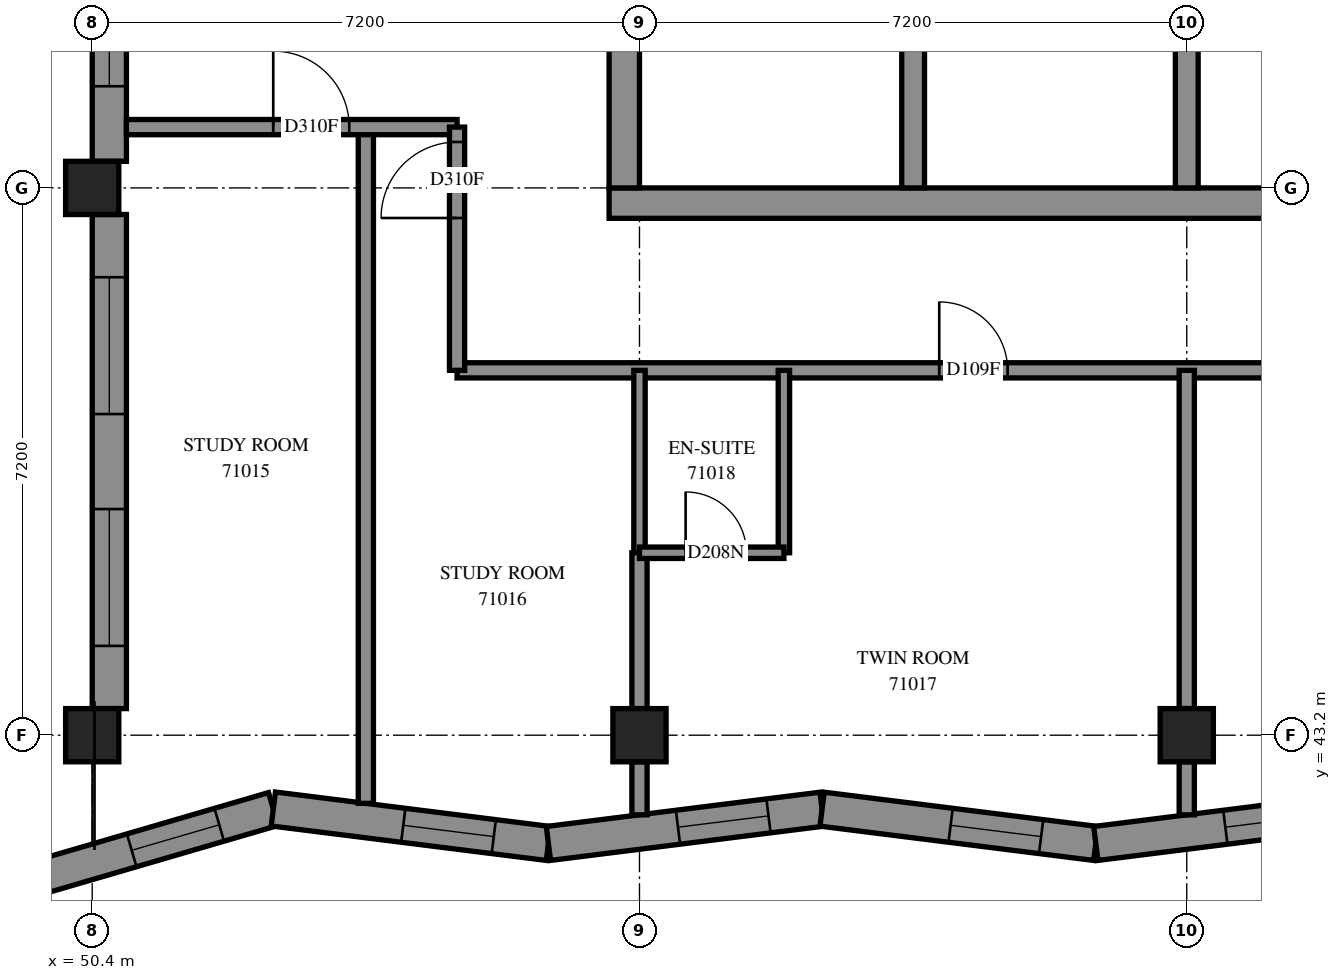
"""IFC4 building model, lengths in metres.
Left out: names, types, materials, properties, quantities, classifications, styles, units other than length and angle.
Written with IfcOpenShell. Run it as: python <this file> out.ifc"""

import sys

from ifc_helpers import new_model, si_unit, direction, frame, frame_2d, origin, origin_2d, place, context, subcontext, project, spatial, polyline, rectangle, outline, extrude, element, fill, save


model = new_model("IFC4")
c1 = context("Model", 3, precision=1e-05, world=origin(), true_north=direction((0.0, 1.0)))
c2 = subcontext(c1, "Body", "Model", "MODEL_VIEW")
j1 = project(units=[si_unit("LENGTHUNIT", "METRE"), si_unit("PLANEANGLEUNIT", "RADIAN")], contexts=[c1])
p1 = place(None, origin())
s1 = spatial("IfcSite", under=j1, at=p1, CompositionType="ELEMENT")
p2 = place(p1, origin())
s2 = spatial("IfcBuilding", under=s1, at=p2, CompositionType="ELEMENT")
p3 = place(p2, frame((0.0, 0.0, 260.8)))
s3 = spatial("IfcBuildingStorey", under=s2, at=p3, CompositionType="ELEMENT", Elevation=260.8)
for number, where, z_axis, x_axis in (
    (1, (50.4, 43.2, 0.0), (0.0, 0.0, 1.0), (1.0, 0.0, 0.0)),
    (2, (50.4, 50.4, 0.0), (0.0, 0.0, 1.0), (1.0, 0.0, 0.0)),
    (3, (57.6, 43.2, 0.0), (0.0, 0.0, 1.0), (1.0, 0.0, 0.0)),
    (4, (64.8, 43.2, 0.0), (0.0, 0.0, 1.0), (1.0, 0.0, 0.0)),
):
    element("IfcColumn", number, at=place(p3, frame(where, z_axis=z_axis, x_axis=x_axis)), inside=s3, PredefinedType="COLUMN", context=c2, shape_type="SweptSolid", body=[
        extrude(rectangle(XDim=0.7, YDim=0.7, at=origin_2d()), origin(), (0.0, 0.0, 1.0), 3.1),
    ])
p4 = place(p3, frame((57.2, 50.2, -0.3), z_axis=(0.0, 0.0, 1.0), x_axis=(1.0, 0.0, 0.0)))
e5 = element("IfcWall", 5, at=p4, inside=s3, PredefinedType="SHEAR", context=c2, shape_type="SweptSolid", body=[
    extrude(rectangle(XDim=15.2, YDim=0.4, at=frame_2d((7.6, 0.0))), origin(), (0.0, 0.0, 1.0), 2.7),
])
p5 = place(p3, frame((57.4, 50.4, -0.3), z_axis=(0.0, 0.0, 1.0), x_axis=(0.0, 1.0, 0.0)))
e6 = element("IfcWall", 6, at=p5, inside=s3, PredefinedType="SHEAR", context=c2, shape_type="SweptSolid", body=[
    extrude(rectangle(XDim=14.4, YDim=0.4, at=frame_2d((7.2, 0.0))), origin(), (0.0, 0.0, 1.0), 2.7),
])
p6 = place(p5, frame((4.55, 0.0, 0.3)))
e7 = element("IfcOpeningElement", 7, at=p6, cuts=e6, PredefinedType="OPENING", context=c2, shape_type="SweptSolid", body=[
    extrude(rectangle(XDim=1.1, YDim=2.1, at=frame_2d((0.55, 1.05))), frame((0.0, 0.21, 0.0), z_axis=(0.0, -1.0, 0.0), x_axis=(1.0, 0.0, 0.0)), (0.0, 0.0, 1.0), 0.42),
])
p7 = place(p5, frame((11.35, 0.0, 0.3)))
e8 = element("IfcOpeningElement", 8, at=p7, cuts=e6, PredefinedType="OPENING", context=c2, shape_type="SweptSolid", body=[
    extrude(rectangle(XDim=1.1, YDim=2.1, at=frame_2d((0.55, 1.05))), frame((0.0, 0.21, 0.0), z_axis=(0.0, -1.0, 0.0), x_axis=(1.0, 0.0, 0.0)), (0.0, 0.0, 1.0), 0.42),
])
for number, where, z_axis, x_axis in (
    (9, (61.2, 50.4, 0.0), (0.0, 0.0, 1.0), (0.0, 1.0, 0.0)),
    (10, (64.8, 50.4, 0.0), (0.0, 0.0, 1.0), (0.0, 1.0, 0.0)),
):
    element("IfcWall", number, at=place(p3, frame(where, z_axis=z_axis, x_axis=x_axis)), inside=s3, PredefinedType="SOLIDWALL", context=c2, shape_type="SweptSolid", body=[
        extrude(rectangle(XDim=3.3, YDim=0.3, at=frame_2d((1.65, 0.0))), origin(), (0.0, 0.0, 1.0), 3.1),
    ])
p8 = place(p3, frame((49.425, 41.249, 0.0), z_axis=(0.0, 0.0, 1.0), x_axis=(0.9599538763, 0.2801580901, 0.0)))
e11 = element("IfcWall", 11, at=p8, inside=s3, PredefinedType="SOLIDWALL", context=c2, shape_type="SweptSolid", body=[
    extrude(outline(polyline([(-0.3, -0.225), (3.451, -0.225), (3.544, 0.225), (0.3, 0.225), (-0.3, -0.225)])), origin(), (0.0, 0.0, 1.0), 3.1),
])
p9 = place(p8, frame((1.557, 0.0, 0.45)))
e12 = element("IfcOpeningElement", 12, at=p9, cuts=e11, PredefinedType="OPENING", context=c2, shape_type="SweptSolid", body=[
    extrude(rectangle(XDim=1.2, YDim=2.55, at=frame_2d((0.6, 1.275))), frame((0.0, 0.235, 0.0), z_axis=(0.0, -1.0, 0.0), x_axis=(1.0, 0.0, 0.0)), (0.0, 0.0, 1.0), 0.47),
])
p10 = place(p3, frame((52.783, 42.229, 0.0), z_axis=(0.0, 0.0, 1.0), x_axis=(0.9922504354, -0.124254068, 0.0)))
e13 = element("IfcWall", 13, at=p10, inside=s3, PredefinedType="SOLIDWALL", context=c2, shape_type="SweptSolid", body=[
    extrude(outline(polyline([(0.047, -0.225), (3.676, -0.225), (3.619, 0.225), (-0.047, 0.225), (0.047, -0.225)])), origin(), (0.0, 0.0, 1.0), 3.1),
])
p11 = place(p10, frame((1.723, 0.0, 0.45)))
e14 = element("IfcOpeningElement", 14, at=p11, cuts=e13, PredefinedType="OPENING", context=c2, shape_type="SweptSolid", body=[
    extrude(rectangle(XDim=1.2, YDim=2.55, at=frame_2d((0.6, 1.275))), frame((0.0, 0.235, 0.0), z_axis=(0.0, -1.0, 0.0), x_axis=(1.0, 0.0, 0.0)), (0.0, 0.0, 1.0), 0.47),
])
p12 = place(p3, frame((56.402, 41.776, 0.0), z_axis=(0.0, 0.0, 1.0), x_axis=(0.9922477484, 0.124275524, 0.0)))
e15 = element("IfcWall", 15, at=p12, inside=s3, PredefinedType="SOLIDWALL", context=c2, shape_type="SweptSolid", body=[
    extrude(outline(polyline([(-0.028, -0.225), (3.601, -0.225), (3.657, 0.225), (0.028, 0.225), (-0.028, -0.225)])), origin(), (0.0, 0.0, 1.0), 3.1),
])
p13 = place(p12, frame((1.718, 0.0, 0.45)))
e16 = element("IfcOpeningElement", 16, at=p13, cuts=e15, PredefinedType="OPENING", context=c2, shape_type="SweptSolid", body=[
    extrude(rectangle(XDim=1.2, YDim=2.55, at=frame_2d((0.6, 1.275))), frame((0.0, 0.235, 0.0), z_axis=(0.0, -1.0, 0.0), x_axis=(1.0, 0.0, 0.0)), (0.0, 0.0, 1.0), 0.47),
])
p14 = place(p3, frame((60.003, 42.227, 0.0), z_axis=(0.0, 0.0, 1.0), x_axis=(0.9922477484, -0.124275524, 0.0)))
e17 = element("IfcWall", 17, at=p14, inside=s3, PredefinedType="SOLIDWALL", context=c2, shape_type="SweptSolid", body=[
    extrude(outline(polyline([(0.028, -0.225), (3.657, -0.225), (3.601, 0.225), (-0.028, 0.225), (0.028, -0.225)])), origin(), (0.0, 0.0, 1.0), 3.1),
])
p15 = place(p14, frame((1.704, 0.0, 0.45)))
e18 = element("IfcOpeningElement", 18, at=p15, cuts=e17, PredefinedType="OPENING", context=c2, shape_type="SweptSolid", body=[
    extrude(rectangle(XDim=1.2, YDim=2.55, at=frame_2d((0.6, 1.275))), frame((0.0, 0.235, 0.0), z_axis=(0.0, -1.0, 0.0), x_axis=(1.0, 0.0, 0.0)), (0.0, 0.0, 1.0), 0.47),
])
p16 = place(p3, frame((63.603, 41.776, 0.0), z_axis=(0.0, 0.0, 1.0), x_axis=(0.9922473228, 0.1242789221, 0.0)))
e19 = element("IfcWall", 19, at=p16, inside=s3, PredefinedType="SOLIDWALL", context=c2, shape_type="SweptSolid", body=[
    extrude(outline(polyline([(-0.028, -0.225), (3.601, -0.225), (3.657, 0.225), (0.028, 0.225), (-0.028, -0.225)])), origin(), (0.0, 0.0, 1.0), 3.1),
])
p17 = place(p16, frame((1.717, 0.0, 0.45)))
e20 = element("IfcOpeningElement", 20, at=p17, cuts=e19, PredefinedType="OPENING", context=c2, shape_type="SweptSolid", body=[
    extrude(rectangle(XDim=1.2, YDim=2.55, at=frame_2d((0.6, 1.275))), frame((0.0, 0.235, 0.0), z_axis=(0.0, -1.0, 0.0), x_axis=(1.0, 0.0, 0.0)), (0.0, 0.0, 1.0), 0.47),
])
p18 = place(p3, frame((50.625, 57.25, 0.0), z_axis=(0.0, 0.0, 1.0), x_axis=(0.0, -1.0, 0.0)))
e21 = element("IfcWall", 21, at=p18, inside=s3, PredefinedType="SOLIDWALL", context=c2, shape_type="SweptSolid", body=[
    extrude(rectangle(XDim=6.5, YDim=0.45, at=frame_2d((3.25, 0.0))), origin(), (0.0, 0.0, 1.0), 3.1),
])
p19 = place(p18, frame((0.825, 0.0, 0.7)))
e22 = element("IfcOpeningElement", 22, at=p19, cuts=e21, PredefinedType="OPENING", context=c2, shape_type="SweptSolid", body=[
    extrude(rectangle(XDim=1.8, YDim=1.8, at=frame_2d((0.9, 0.9))), frame((0.0, 0.235, 0.0), z_axis=(0.0, -1.0, 0.0), x_axis=(1.0, 0.0, 0.0)), (0.0, 0.0, 1.0), 0.47),
])
p20 = place(p18, frame((4.312, 0.0, 0.6)))
e23 = element("IfcOpeningElement", 23, at=p20, cuts=e21, PredefinedType="OPENING", context=c2, shape_type="SweptSolid", body=[
    extrude(rectangle(XDim=1.2, YDim=1.9, at=frame_2d((0.6, 0.95))), frame((0.0, 0.235, 0.0), z_axis=(0.0, -1.0, 0.0), x_axis=(1.0, 0.0, 0.0)), (0.0, 0.0, 1.0), 0.47),
])
p21 = place(p3, frame((50.625, 50.05, 0.0), z_axis=(0.0, 0.0, 1.0), x_axis=(0.0, -1.0, 0.0)))
e24 = element("IfcWall", 24, at=p21, inside=s3, PredefinedType="SOLIDWALL", context=c2, shape_type="SweptSolid", body=[
    extrude(rectangle(XDim=6.5, YDim=0.45, at=frame_2d((3.25, 0.0))), origin(), (0.0, 0.0, 1.0), 3.1),
])
p22 = place(p21, frame((0.825, 0.0, 0.7)))
e25 = element("IfcOpeningElement", 25, at=p22, cuts=e24, PredefinedType="OPENING", context=c2, shape_type="SweptSolid", body=[
    extrude(rectangle(XDim=1.8, YDim=1.8, at=frame_2d((0.9, 0.9))), frame((0.0, 0.235, 0.0), z_axis=(0.0, -1.0, 0.0), x_axis=(1.0, 0.0, 0.0)), (0.0, 0.0, 1.0), 0.47),
])
p23 = place(p21, frame((3.875, 0.0, 0.7)))
e26 = element("IfcOpeningElement", 26, at=p23, cuts=e24, PredefinedType="OPENING", context=c2, shape_type="SweptSolid", body=[
    extrude(rectangle(XDim=1.8, YDim=1.8, at=frame_2d((0.9, 0.9))), frame((0.0, 0.235, 0.0), z_axis=(0.0, -1.0, 0.0), x_axis=(1.0, 0.0, 0.0)), (0.0, 0.0, 1.0), 0.47),
])
p24 = place(p3, frame((55.2, 48.0, 0.0), z_axis=(0.0, 0.0, 1.0), x_axis=(1.0, 0.0, 0.0)))
e27 = element("IfcWall", 27, at=p24, inside=s3, PredefinedType="PARTITIONING", context=c2, shape_type="SweptSolid", body=[
    extrude(rectangle(XDim=19.15, YDim=0.2, at=frame_2d((9.575, 0.0))), origin(), (0.0, 0.0, 1.0), 3.1),
])
p25 = place(p24, frame((6.343, 0.0, 0.0)))
e28 = element("IfcOpeningElement", 28, at=p25, cuts=e27, PredefinedType="OPENING", context=c2, shape_type="SweptSolid", body=[
    extrude(rectangle(XDim=0.9, YDim=2.1, at=frame_2d((0.45, 1.05))), frame((0.0, 0.11, 0.0), z_axis=(0.0, -1.0, 0.0), x_axis=(1.0, 0.0, 0.0)), (0.0, 0.0, 1.0), 0.22),
])
p26 = place(p24, frame((11.633, 0.0, 0.0)))
e29 = element("IfcOpeningElement", 29, at=p26, cuts=e27, PredefinedType="OPENING", context=c2, shape_type="SweptSolid", body=[
    extrude(rectangle(XDim=1.0, YDim=2.1, at=frame_2d((0.5, 1.05))), frame((0.0, 0.11, 0.0), z_axis=(0.0, -1.0, 0.0), x_axis=(1.0, 0.0, 0.0)), (0.0, 0.0, 1.0), 0.22),
])
p27 = place(p24, frame((13.707, 0.0, 0.0)))
e30 = element("IfcOpeningElement", 30, at=p27, cuts=e27, PredefinedType="OPENING", context=c2, shape_type="SweptSolid", body=[
    extrude(rectangle(XDim=1.0, YDim=2.1, at=frame_2d((0.5, 1.05))), frame((0.0, 0.11, 0.0), z_axis=(0.0, -1.0, 0.0), x_axis=(1.0, 0.0, 0.0)), (0.0, 0.0, 1.0), 0.22),
])
p28 = place(p3, frame((54.0, 42.303, 0.0), z_axis=(0.0, 0.0, 1.0), x_axis=(0.0, 1.0, 0.0)))
e31 = element("IfcWall", 31, at=p28, inside=s3, PredefinedType="PARTITIONING", context=c2, shape_type="SweptSolid", body=[
    extrude(rectangle(XDim=8.897, YDim=0.2, at=frame_2d((4.448, 0.0))), origin(), (0.0, 0.0, 1.0), 3.1),
])
p29 = place(p3, frame((64.8, 43.55, 0.0), z_axis=(0.0, 0.0, 1.0), x_axis=(0.0, 1.0, 0.0)))
e32 = element("IfcWall", 32, at=p29, inside=s3, PredefinedType="PARTITIONING", context=c2, shape_type="SweptSolid", body=[
    extrude(rectangle(XDim=4.45, YDim=0.2, at=frame_2d((2.225, 0.0))), origin(), (0.0, 0.0, 1.0), 3.1),
])
p30 = place(p3, frame((50.85, 51.2, 0.0), z_axis=(0.0, 0.0, 1.0), x_axis=(1.0, 0.0, 0.0)))
e33 = element("IfcWall", 33, at=p30, inside=s3, PredefinedType="PARTITIONING", context=c2, shape_type="SweptSolid", body=[
    extrude(rectangle(XDim=4.35, YDim=0.2, at=frame_2d((2.175, 0.0))), origin(), (0.0, 0.0, 1.0), 3.1),
])
p31 = place(p30, frame((1.931, 0.0, 0.0)))
e34 = element("IfcOpeningElement", 34, at=p31, cuts=e33, PredefinedType="OPENING", context=c2, shape_type="SweptSolid", body=[
    extrude(rectangle(XDim=1.0, YDim=2.1, at=frame_2d((0.5, 1.05))), frame((0.0, 0.11, 0.0), z_axis=(0.0, -1.0, 0.0), x_axis=(1.0, 0.0, 0.0)), (0.0, 0.0, 1.0), 0.22),
])
p32 = place(p3, frame((55.2, 48.0, 0.0), z_axis=(0.0, 0.0, 1.0), x_axis=(0.0, 1.0, 0.0)))
e35 = element("IfcWall", 35, at=p32, inside=s3, PredefinedType="PARTITIONING", context=c2, shape_type="SweptSolid", body=[
    extrude(rectangle(XDim=3.2, YDim=0.2, at=frame_2d((1.6, 0.0))), origin(), (0.0, 0.0, 1.0), 3.1),
])
p33 = place(p32, frame((2.004, 0.0, 0.0)))
e36 = element("IfcOpeningElement", 36, at=p33, cuts=e35, PredefinedType="OPENING", context=c2, shape_type="SweptSolid", body=[
    extrude(rectangle(XDim=1.0, YDim=2.1, at=frame_2d((0.5, 1.05))), frame((0.0, 0.11, 0.0), z_axis=(0.0, -1.0, 0.0), x_axis=(1.0, 0.0, 0.0)), (0.0, 0.0, 1.0), 0.22),
])
for number, where, z_axis, x_axis in (
    (37, (59.5, 45.6, 0.0), (0.0, 0.0, 1.0), (0.0, 1.0, 0.0)),
    (38, (57.6, 45.6, 0.0), (0.0, 0.0, 1.0), (0.0, 1.0, 0.0)),
):
    element("IfcWall", number, at=place(p3, frame(where, z_axis=z_axis, x_axis=x_axis)), inside=s3, PredefinedType="PARTITIONING", context=c2, shape_type="SweptSolid", body=[
        extrude(rectangle(XDim=2.4, YDim=0.15, at=frame_2d((1.2, 0.0))), origin(), (0.0, 0.0, 1.0), 3.1),
    ])
p34 = place(p3, frame((57.6, 43.55, 0.0), z_axis=(0.0, 0.0, 1.0), x_axis=(0.0, 1.0, 0.0)))
e39 = element("IfcWall", 39, at=p34, inside=s3, PredefinedType="PARTITIONING", context=c2, shape_type="SweptSolid", body=[
    extrude(rectangle(XDim=2.05, YDim=0.2, at=frame_2d((1.025, 0.0))), origin(), (0.0, 0.0, 1.0), 3.1),
])
p35 = place(p3, frame((57.6, 45.6, 0.0), z_axis=(0.0, 0.0, 1.0), x_axis=(1.0, 0.0, 0.0)))
e40 = element("IfcWall", 40, at=p35, inside=s3, PredefinedType="PARTITIONING", context=c2, shape_type="SweptSolid", body=[
    extrude(rectangle(XDim=1.9, YDim=0.15, at=frame_2d((0.95, 0.0))), origin(), (0.0, 0.0, 1.0), 3.1),
])
p36 = place(p35, frame((0.607, 0.0, 0.0)))
e41 = element("IfcOpeningElement", 41, at=p36, cuts=e40, PredefinedType="OPENING", context=c2, shape_type="SweptSolid", body=[
    extrude(rectangle(XDim=0.8, YDim=2.1, at=frame_2d((0.4, 1.05))), frame((0.0, 0.085, 0.0), z_axis=(0.0, -1.0, 0.0), x_axis=(1.0, 0.0, 0.0)), (0.0, 0.0, 1.0), 0.17),
])
p37 = place(p3, frame((64.8, 42.152, 0.0), z_axis=(0.0, 0.0, 1.0), x_axis=(0.0, 1.0, 0.0)))
e42 = element("IfcWall", 42, at=p37, inside=s3, PredefinedType="PARTITIONING", context=c2, shape_type="SweptSolid", body=[
    extrude(rectangle(XDim=0.698, YDim=0.2, at=frame_2d((0.349, 0.0))), origin(), (0.0, 0.0, 1.0), 3.1),
])
p38 = place(p3, frame((57.6, 42.153, 0.0), z_axis=(0.0, 0.0, 1.0), x_axis=(0.0, 1.0, 0.0)))
e43 = element("IfcWall", 43, at=p38, inside=s3, PredefinedType="PARTITIONING", context=c2, shape_type="SweptSolid", body=[
    extrude(rectangle(XDim=0.697, YDim=0.2, at=frame_2d((0.349, 0.0))), origin(), (0.0, 0.0, 1.0), 3.1),
])
p39 = place(p9, origin())
e44 = element("IfcWindow", 44, at=p39, inside=s3, PartitioningType="SINGLE_PANEL", PredefinedType="WINDOW", context=c2, shape_type="SweptSolid", body=[
    extrude(rectangle(XDim=1.2, YDim=2.55, at=frame_2d((0.6, 1.275))), frame((0.0, 0.205, 0.0), z_axis=(0.0, -1.0, 0.0), x_axis=(1.0, 0.0, 0.0)), (0.0, 0.0, 1.0), 0.06),
])
fill(e12, e44)
p40 = place(p11, origin())
e45 = element("IfcWindow", 45, at=p40, inside=s3, PartitioningType="SINGLE_PANEL", PredefinedType="WINDOW", context=c2, shape_type="SweptSolid", body=[
    extrude(rectangle(XDim=1.2, YDim=2.55, at=frame_2d((0.6, 1.275))), frame((0.0, 0.205, 0.0), z_axis=(0.0, -1.0, 0.0), x_axis=(1.0, 0.0, 0.0)), (0.0, 0.0, 1.0), 0.06),
])
fill(e14, e45)
p41 = place(p13, origin())
e46 = element("IfcWindow", 46, at=p41, inside=s3, PartitioningType="SINGLE_PANEL", PredefinedType="WINDOW", context=c2, shape_type="SweptSolid", body=[
    extrude(rectangle(XDim=1.2, YDim=2.55, at=frame_2d((0.6, 1.275))), frame((0.0, 0.205, 0.0), z_axis=(0.0, -1.0, 0.0), x_axis=(1.0, 0.0, 0.0)), (0.0, 0.0, 1.0), 0.06),
])
fill(e16, e46)
p42 = place(p15, origin())
e47 = element("IfcWindow", 47, at=p42, inside=s3, PartitioningType="SINGLE_PANEL", PredefinedType="WINDOW", context=c2, shape_type="SweptSolid", body=[
    extrude(rectangle(XDim=1.2, YDim=2.55, at=frame_2d((0.6, 1.275))), frame((0.0, 0.205, 0.0), z_axis=(0.0, -1.0, 0.0), x_axis=(1.0, 0.0, 0.0)), (0.0, 0.0, 1.0), 0.06),
])
fill(e18, e47)
p43 = place(p17, origin())
e48 = element("IfcWindow", 48, at=p43, inside=s3, PartitioningType="SINGLE_PANEL", PredefinedType="WINDOW", context=c2, shape_type="SweptSolid", body=[
    extrude(rectangle(XDim=1.2, YDim=2.55, at=frame_2d((0.6, 1.275))), frame((0.0, 0.205, 0.0), z_axis=(0.0, -1.0, 0.0), x_axis=(1.0, 0.0, 0.0)), (0.0, 0.0, 1.0), 0.06),
])
fill(e20, e48)
p44 = place(p22, origin())
e49 = element("IfcWindow", 49, at=p44, inside=s3, PartitioningType="SINGLE_PANEL", PredefinedType="WINDOW", context=c2, shape_type="SweptSolid", body=[
    extrude(rectangle(XDim=1.8, YDim=1.8, at=frame_2d((0.9, 0.9))), frame((0.0, 0.205, 0.0), z_axis=(0.0, -1.0, 0.0), x_axis=(1.0, 0.0, 0.0)), (0.0, 0.0, 1.0), 0.06),
])
fill(e25, e49)
p45 = place(p23, origin())
e50 = element("IfcWindow", 50, at=p45, inside=s3, PartitioningType="SINGLE_PANEL", PredefinedType="WINDOW", context=c2, shape_type="SweptSolid", body=[
    extrude(rectangle(XDim=1.8, YDim=1.8, at=frame_2d((0.9, 0.9))), frame((0.0, 0.205, 0.0), z_axis=(0.0, -1.0, 0.0), x_axis=(1.0, 0.0, 0.0)), (0.0, 0.0, 1.0), 0.06),
])
fill(e26, e50)
p46 = place(p31, origin())
e51 = element("IfcDoor", 51, at=p46, inside=s3, OperationType="SINGLE_SWING_LEFT", PredefinedType="DOOR", context=c2, shape_type="SweptSolid", body=[
    extrude(rectangle(XDim=1.0, YDim=2.1, at=frame_2d((0.5, 1.05))), frame((0.0, 0.025, 0.0), z_axis=(0.0, -1.0, 0.0), x_axis=(1.0, 0.0, 0.0)), (0.0, 0.0, 1.0), 0.05),
])
fill(e34, e51)
p47 = place(p33, origin())
e52 = element("IfcDoor", 52, at=p47, inside=s3, OperationType="SINGLE_SWING_RIGHT", PredefinedType="DOOR", context=c2, shape_type="SweptSolid", body=[
    extrude(rectangle(XDim=1.0, YDim=2.1, at=frame_2d((0.5, 1.05))), frame((0.0, 0.025, 0.0), z_axis=(0.0, -1.0, 0.0), x_axis=(1.0, 0.0, 0.0)), (0.0, 0.0, 1.0), 0.05),
])
fill(e36, e52)
p48 = place(p25, origin())
e53 = element("IfcDoor", 53, at=p48, inside=s3, OperationType="SINGLE_SWING_LEFT", PredefinedType="DOOR", context=c2, shape_type="SweptSolid", body=[
    extrude(rectangle(XDim=0.9, YDim=2.1, at=frame_2d((0.45, 1.05))), frame((0.0, 0.025, 0.0), z_axis=(0.0, -1.0, 0.0), x_axis=(1.0, 0.0, 0.0)), (0.0, 0.0, 1.0), 0.05),
])
fill(e28, e53)
p49 = place(p36, origin())
e54 = element("IfcDoor", 54, at=p49, inside=s3, OperationType="SINGLE_SWING_RIGHT", PredefinedType="DOOR", context=c2, shape_type="SweptSolid", body=[
    extrude(rectangle(XDim=0.8, YDim=2.1, at=frame_2d((0.4, 1.05))), frame((0.0, 0.025, 0.0), z_axis=(0.0, -1.0, 0.0), x_axis=(1.0, 0.0, 0.0)), (0.0, 0.0, 1.0), 0.05),
])
fill(e41, e54)
p50 = place(p20, origin())
e55 = element("IfcWindow", 55, at=p50, inside=s3, PartitioningType="SINGLE_PANEL", PredefinedType="WINDOW", context=c2, shape_type="SweptSolid", body=[
    extrude(rectangle(XDim=1.2, YDim=1.9, at=frame_2d((0.6, 0.95))), frame((0.0, 0.205, 0.0), z_axis=(0.0, -1.0, 0.0), x_axis=(1.0, 0.0, 0.0)), (0.0, 0.0, 1.0), 0.06),
])
fill(e23, e55)
save(model, sys.argv[1])
